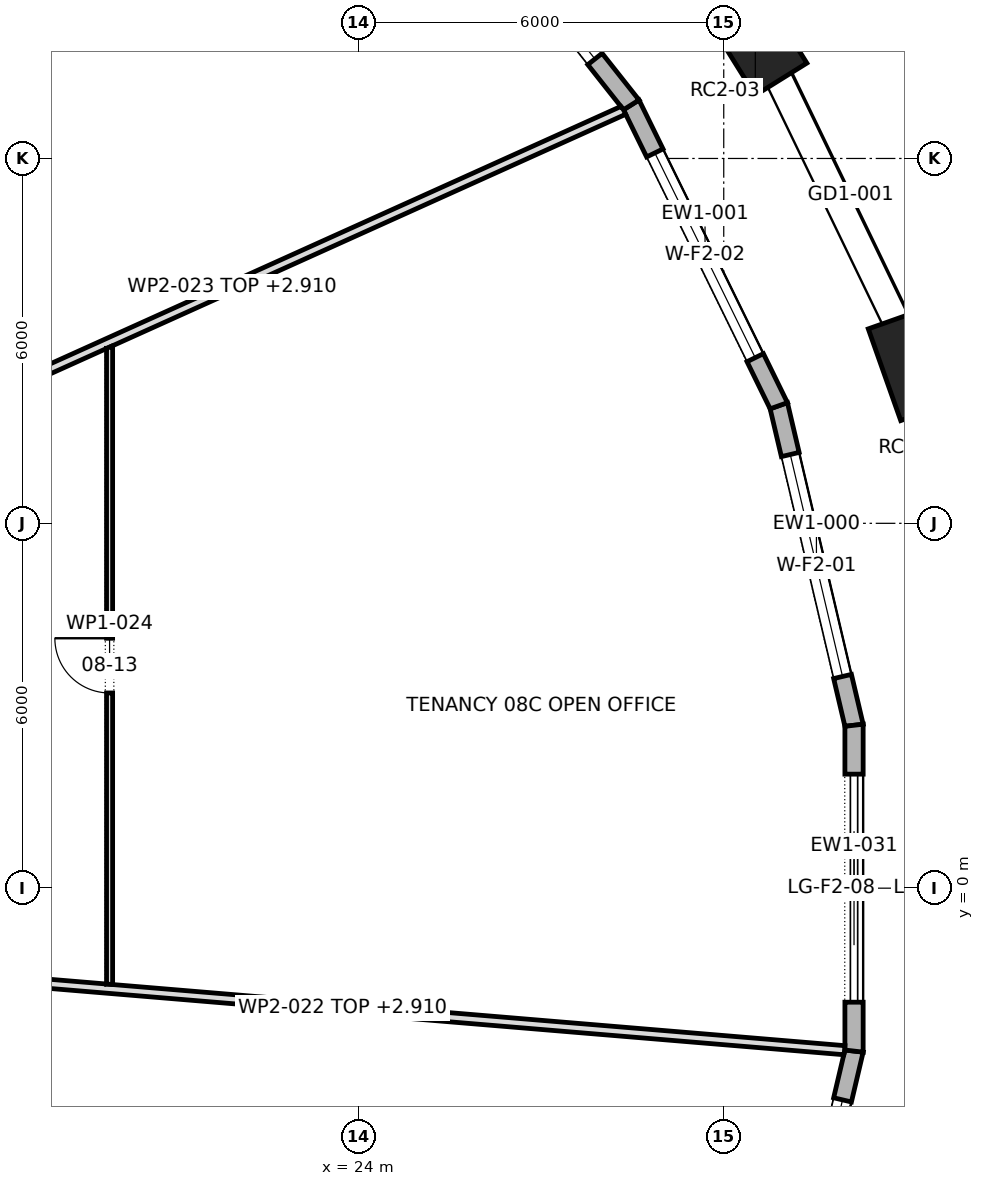
"""IFC4 building model, lengths in metres.
Left out: names, types, materials, properties, quantities, classifications, styles, units other than length and angle.
Written with IfcOpenShell. Run it as: python <this file> out.ifc"""

import sys

from ifc_helpers import new_model, si_unit, direction, frame, frame_2d, origin, origin_2d, place, context, subcontext, project, spatial, polyline, rectangle, outline, extrude, element, fill, save


model = new_model("IFC4")
c1 = context("Model", 3, precision=1e-05, world=origin(), true_north=direction((0.0, 1.0)))
c2 = subcontext(c1, "Body", "Model", "MODEL_VIEW")
j1 = project(units=[si_unit("LENGTHUNIT", "METRE"), si_unit("PLANEANGLEUNIT", "RADIAN")], contexts=[c1])
p1 = place(None, origin())
s1 = spatial("IfcSite", under=j1, at=p1, CompositionType="ELEMENT")
p2 = place(p1, origin())
s2 = spatial("IfcBuilding", under=s1, at=p2, CompositionType="ELEMENT")
p3 = place(p2, frame((0.0, 0.0, 125.5)))
s3 = spatial("IfcBuildingStorey", under=s2, at=p3, CompositionType="ELEMENT", Elevation=125.5)
for number, where, z_axis, x_axis in (
    (1, (33.115, 8.61, 0.0), (0.0, 0.0, 1.0), (-0.334, 0.943, 0.0)),
    (2, (30.519, 13.982, 0.0), (0.0, 0.0, 1.0), (-0.529, 0.849, 0.0)),
):
    element("IfcColumn", number, at=place(p3, frame(where, z_axis=z_axis, x_axis=x_axis)), inside=s3, PredefinedType="COLUMN", context=c2, shape_type="SweptSolid", body=[
        extrude(rectangle(XDim=1.6, YDim=1.0, at=origin_2d()), origin(), (0.0, 0.0, 1.0), 4.2),
    ])
p4 = place(p3, frame((32.143, 2.679, 0.0), z_axis=(0.0, 0.0, 1.0), x_axis=(-0.229200658045, 0.973379195561, 0.0)))
e3 = element("IfcWall", 3, at=p4, inside=s3, PredefinedType="STANDARD", context=c2, shape_type="SweptSolid", body=[
    extrude(outline(polyline([(-0.017, -0.15), (5.415, -0.15), (5.382, 0.15), (0.017, 0.15), (-0.017, -0.15)])), origin(), (0.0, 0.0, 1.0), 3.9),
])
p5 = place(p4, frame((0.824, 0.0, 0.6)))
e4 = element("IfcOpeningElement", 4, at=p5, cuts=e3, PredefinedType="OPENING", context=c2, shape_type="SweptSolid", body=[
    extrude(rectangle(XDim=3.75, YDim=2.85, at=frame_2d((1.875, 1.425))), frame((0.0, 0.162, 0.0), z_axis=(0.0, -1.0, 0.0), x_axis=(1.0, 0.0, 0.0)), (0.0, 0.0, 1.0), 0.324),
])
p6 = place(p3, frame((30.905, 7.934, 0.0), z_axis=(0.0, 0.0, 1.0), x_axis=(-0.440306401535, 0.897847577692, 0.0)))
e5 = element("IfcWall", 5, at=p6, inside=s3, PredefinedType="STANDARD", context=c2, shape_type="SweptSolid", body=[
    extrude(outline(polyline([(-0.017, -0.15), (5.527, -0.15), (5.494, 0.15), (0.017, 0.15), (-0.017, -0.15)])), origin(), (0.0, 0.0, 1.0), 3.9),
])
p7 = place(p6, frame((0.88, 0.0, 0.6)))
e6 = element("IfcOpeningElement", 6, at=p7, cuts=e5, PredefinedType="OPENING", context=c2, shape_type="SweptSolid", body=[
    extrude(rectangle(XDim=3.75, YDim=2.85, at=frame_2d((1.875, 1.425))), frame((0.0, 0.162, 0.0), z_axis=(0.0, -1.0, 0.0), x_axis=(1.0, 0.0, 0.0)), (0.0, 0.0, 1.0), 0.324),
])
p8 = place(p3, frame((28.479, 12.881, 0.0), z_axis=(0.0, 0.0, 1.0), x_axis=(-0.62038332391, 0.784298751379, 0.0)))
e7 = element("IfcWall", 7, at=p8, inside=s3, PredefinedType="STANDARD", context=c2, shape_type="SweptSolid", body=[
    extrude(outline(polyline([(-0.016, -0.15), (5.69, -0.15), (5.66, 0.15), (0.016, 0.15), (-0.016, -0.15)])), origin(), (0.0, 0.0, 1.0), 3.9),
])
p9 = place(p8, frame((0.962, 0.0, 0.6)))
e8 = element("IfcOpeningElement", 8, at=p9, cuts=e7, PredefinedType="OPENING", context=c2, shape_type="SweptSolid", body=[
    extrude(rectangle(XDim=3.75, YDim=2.85, at=frame_2d((1.875, 1.425))), frame((0.0, 0.162, 0.0), z_axis=(0.0, -1.0, 0.0), x_axis=(1.0, 0.0, 0.0)), (0.0, 0.0, 1.0), 0.324),
])
p10 = place(p3, frame((30.905, -7.934, 0.0), z_axis=(0.0, 0.0, 1.0), x_axis=(0.229200658045, 0.973379195561, 0.0)))
e9 = element("IfcWall", 9, at=p10, inside=s3, PredefinedType="STANDARD", context=c2, shape_type="SweptSolid", body=[
    extrude(outline(polyline([(-0.017, -0.15), (5.416, -0.15), (5.381, 0.15), (0.017, 0.15), (-0.017, -0.15)])), origin(), (0.0, 0.0, 1.0), 3.9),
])
p11 = place(p10, frame((0.824, 0.0, 0.6)))
e10 = element("IfcOpeningElement", 10, at=p11, cuts=e9, PredefinedType="OPENING", context=c2, shape_type="SweptSolid", body=[
    extrude(rectangle(XDim=3.75, YDim=2.85, at=frame_2d((1.875, 1.425))), frame((0.0, 0.162, 0.0), z_axis=(0.0, -1.0, 0.0), x_axis=(1.0, 0.0, 0.0)), (0.0, 0.0, 1.0), 0.324),
])
p12 = place(p3, frame((32.143, -2.679, 0.0), z_axis=(0.0, 0.0, 1.0), x_axis=(0.0, 1.0, 0.0)))
e11 = element("IfcWall", 11, at=p12, inside=s3, PredefinedType="STANDARD", context=c2, shape_type="SweptSolid", body=[
    extrude(outline(polyline([(-0.017, -0.15), (5.375, -0.15), (5.341, 0.15), (0.017, 0.15), (-0.017, -0.15)])), origin(), (0.0, 0.0, 1.0), 3.9),
])
p13 = place(p12, frame((0.804, 0.0, 0.0)))
e12 = element("IfcOpeningElement", 12, at=p13, cuts=e11, PredefinedType="OPENING", context=c2, shape_type="SweptSolid", body=[
    extrude(rectangle(XDim=3.75, YDim=3.45, at=frame_2d((1.875, 1.725))), frame((0.0, 0.162, 0.0), z_axis=(0.0, -1.0, 0.0), x_axis=(1.0, 0.0, 0.0)), (0.0, 0.0, 1.0), 0.324),
])
p14 = place(p3, frame((15.469, -1.286, 0.0), z_axis=(0.0, 0.0, 1.0), x_axis=(0.996533353756, -0.083194199634, 0.0)))
e13 = element("IfcWall", 13, at=p14, inside=s3, PredefinedType="PARTITIONING", context=c2, shape_type="SweptSolid", body=[
    extrude(outline(polyline([(0.012, -0.075), (1.852, -0.075), (3.691, -0.075), (5.531, -0.075), (7.371, -0.075), (9.21, -0.075), (11.05, -0.075), (12.89, -0.075), (14.729, -0.075), (16.569, -0.075), (16.574, -0.037), (16.574, 0.075), (14.836, 0.075), (13.097, 0.075), (11.358, 0.075), (9.619, 0.075), (7.881, 0.075), (6.142, 0.075), (4.403, 0.075), (4.39, 0.074), (4.39, 0.075), (2.927, 0.075), (1.463, 0.075), (0.0, 0.075), (0.0, 0.069), (0.012, -0.075)])), origin(), (0.0, 0.0, 1.0), 2.91),
])
p15 = place(p3, frame((15.444, 6.97, 0.0), z_axis=(0.0, 0.0, 1.0), x_axis=(0.911543819319, 0.411202949237, 0.0)))
e14 = element("IfcWall", 14, at=p15, inside=s3, PredefinedType="PARTITIONING", context=c2, shape_type="SweptSolid", body=[
    extrude(outline(polyline([(0.0, -0.075), (1.6, -0.075), (3.2, -0.075), (4.8, -0.075), (4.801, -0.073), (4.805, -0.075), (6.677, -0.075), (8.549, -0.075), (10.421, -0.075), (12.293, -0.075), (14.166, -0.075), (14.166, -0.063), (14.163, 0.007), (14.146, 0.075), (12.386, 0.075), (10.627, 0.075), (8.867, 0.075), (7.107, 0.075), (5.347, 0.075), (3.587, 0.075), (1.828, 0.075), (0.068, 0.075), (0.0, -0.075)])), origin(), (0.0, 0.0, 1.0), 2.91),
])
p16 = place(p3, frame((19.9, 8.92, 0.0), z_axis=(0.0, 0.0, 1.0), x_axis=(0.0, -1.0, 0.0)))
e15 = element("IfcWall", 15, at=p16, inside=s3, PredefinedType="PARTITIONING", context=c2, shape_type="SweptSolid", body=[
    extrude(outline(polyline([(0.045, -0.05), (1.787, -0.05), (3.529, -0.05), (5.271, -0.05), (7.012, -0.05), (8.754, -0.05), (10.496, -0.05), (10.504, 0.048), (10.504, 0.05), (8.754, 0.05), (7.003, 0.05), (5.252, 0.05), (3.501, 0.05), (1.751, 0.05), (0.0, 0.05), (0.0, 0.049), (0.045, -0.05)])), origin(), (0.0, 0.0, 1.0), 3.9),
])
p17 = place(p16, frame((4.81, 0.0, 0.0)))
e16 = element("IfcOpeningElement", 16, at=p17, cuts=e15, PredefinedType="OPENING", context=c2, shape_type="SweptSolid", body=[
    extrude(rectangle(XDim=0.9, YDim=2.1, at=frame_2d((0.45, 1.05))), frame((0.0, 0.062, 0.0), z_axis=(0.0, -1.0, 0.0), x_axis=(1.0, 0.0, 0.0)), (0.0, 0.0, 1.0), 0.124),
])
p18 = place(p5, origin())
e17 = element("IfcWindow", 17, at=p18, inside=s3, PartitioningType="TRIPLE_PANEL_VERTICAL", PredefinedType="WINDOW", context=c2, shape_type="SweptSolid", body=[
    extrude(rectangle(XDim=3.75, YDim=2.85, at=frame_2d((1.875, 1.425))), frame((0.0, 0.03, 0.0), z_axis=(0.0, -1.0, 0.0), x_axis=(1.0, 0.0, 0.0)), (0.0, 0.0, 1.0), 0.06),
])
fill(e4, e17)
p19 = place(p7, origin())
e18 = element("IfcWindow", 18, at=p19, inside=s3, PartitioningType="TRIPLE_PANEL_VERTICAL", PredefinedType="WINDOW", context=c2, shape_type="SweptSolid", body=[
    extrude(rectangle(XDim=3.75, YDim=2.85, at=frame_2d((1.875, 1.425))), frame((0.0, 0.03, 0.0), z_axis=(0.0, -1.0, 0.0), x_axis=(1.0, 0.0, 0.0)), (0.0, 0.0, 1.0), 0.06),
])
fill(e6, e18)
p20 = place(p9, origin())
e19 = element("IfcWindow", 19, at=p20, inside=s3, PartitioningType="TRIPLE_PANEL_VERTICAL", PredefinedType="WINDOW", context=c2, shape_type="SweptSolid", body=[
    extrude(rectangle(XDim=3.75, YDim=2.85, at=frame_2d((1.875, 1.425))), frame((0.0, 0.03, 0.0), z_axis=(0.0, -1.0, 0.0), x_axis=(1.0, 0.0, 0.0)), (0.0, 0.0, 1.0), 0.06),
])
fill(e8, e19)
p21 = place(p11, origin())
e20 = element("IfcWindow", 20, at=p21, inside=s3, PartitioningType="TRIPLE_PANEL_VERTICAL", PredefinedType="WINDOW", context=c2, shape_type="SweptSolid", body=[
    extrude(rectangle(XDim=3.75, YDim=2.85, at=frame_2d((1.875, 1.425))), frame((0.0, 0.03, 0.0), z_axis=(0.0, -1.0, 0.0), x_axis=(1.0, 0.0, 0.0)), (0.0, 0.0, 1.0), 0.06),
])
fill(e10, e20)
p22 = place(p13, origin())
e21 = element("IfcDoor", 21, at=p22, inside=s3, OperationType="DOUBLE_DOOR_SLIDING", PredefinedType="DOOR", context=c2, shape_type="SweptSolid", body=[
    extrude(rectangle(XDim=3.75, YDim=3.45, at=frame_2d((1.875, 1.725))), frame((0.0, 0.025, 0.0), z_axis=(0.0, -1.0, 0.0), x_axis=(1.0, 0.0, 0.0)), (0.0, 0.0, 1.0), 0.05),
])
fill(e12, e21)
p23 = place(p17, frame((0.9, 0.0, 0.0), z_axis=(0.0, 0.0, 1.0), x_axis=(-1.0, 0.0, 0.0)))
e22 = element("IfcDoor", 22, at=p23, inside=s3, OperationType="SINGLE_SWING_LEFT", PredefinedType="DOOR", context=c2, shape_type="SweptSolid", body=[
    extrude(rectangle(XDim=0.9, YDim=2.1, at=frame_2d((0.45, 1.05))), frame((0.0, 0.025, 0.0), z_axis=(0.0, -1.0, 0.0), x_axis=(1.0, 0.0, 0.0)), (0.0, 0.0, 1.0), 0.05),
])
fill(e16, e22)
save(model, sys.argv[1])
